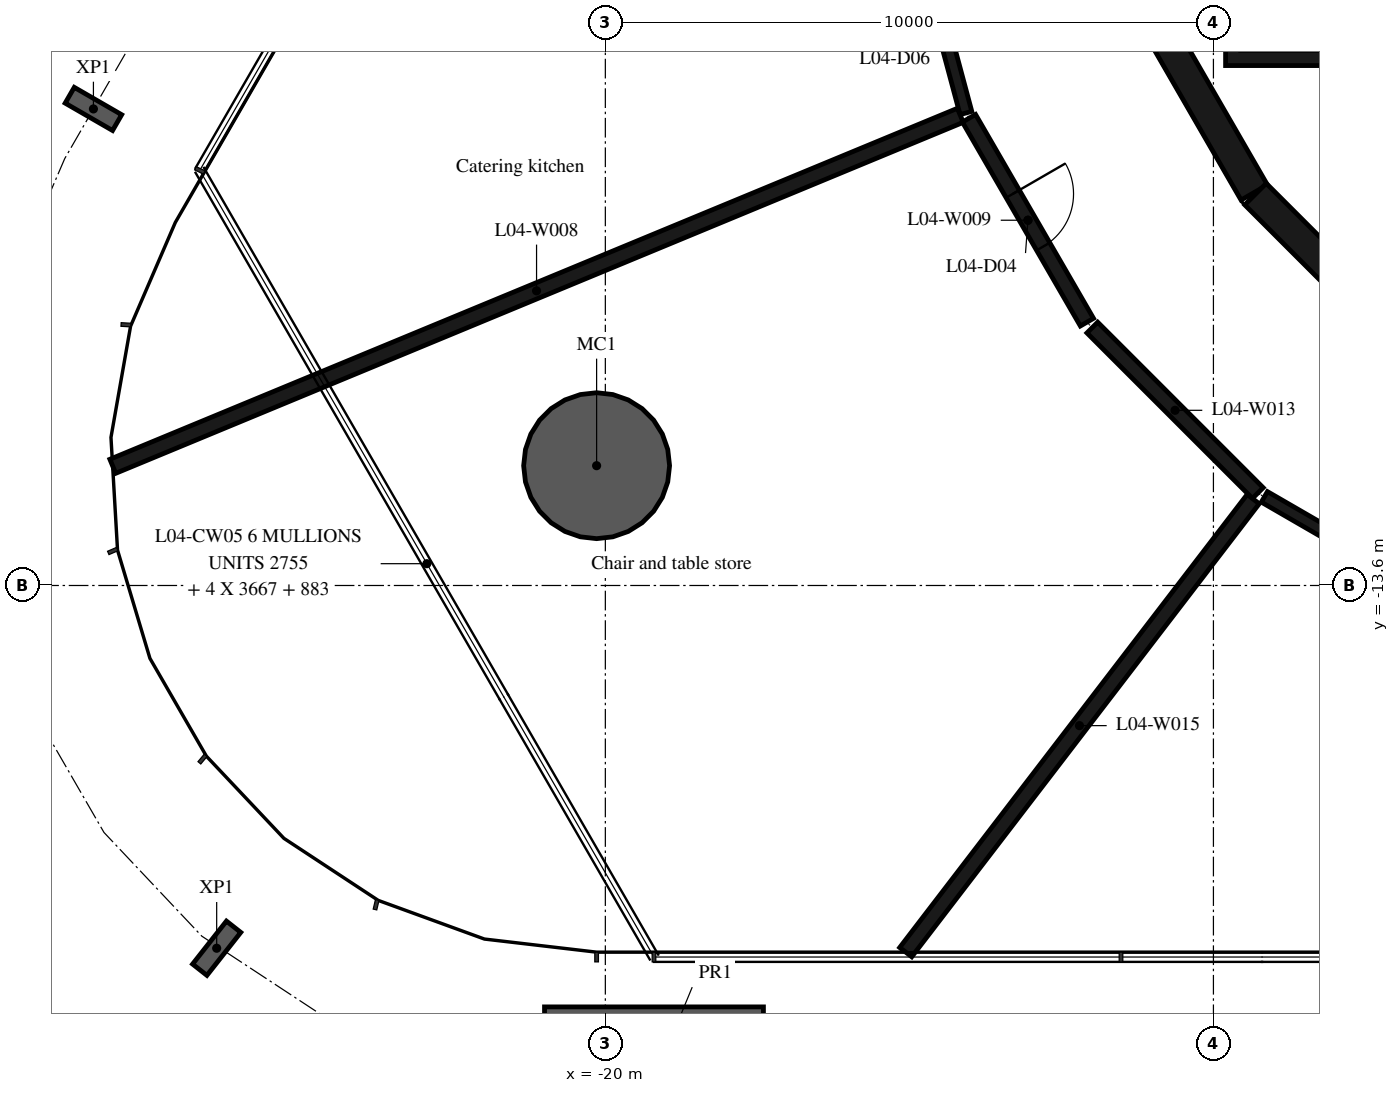
"""IFC4 building model, lengths in metres.
Left out: names, types, materials, properties, quantities, classifications, styles, units other than length and angle.
Written with IfcOpenShell. Run it as: python <this file> out.ifc"""

import sys

from ifc_helpers import new_model, si_unit, direction, frame, frame_2d, origin, origin_2d, place, context, subcontext, project, spatial, polyline, rectangle, hollow_circle, i_section, outline, extrude, element, fill, save


model = new_model("IFC4")
c1 = context("Model", 3, precision=1e-05, world=origin(), true_north=direction((0.0, 1.0)))
c2 = subcontext(c1, "Body", "Model", "MODEL_VIEW")
j1 = project(units=[si_unit("LENGTHUNIT", "METRE"), si_unit("PLANEANGLEUNIT", "RADIAN")], contexts=[c1])
p1 = place(None, origin())
s1 = spatial("IfcSite", under=j1, at=p1, CompositionType="ELEMENT")
p2 = place(p1, origin())
s2 = spatial("IfcBuilding", under=s1, at=p2, CompositionType="ELEMENT")
p3 = place(p2, frame((0.0, 0.0, 23.4)))
s3 = spatial("IfcBuildingStorey", under=s2, at=p3, CompositionType="ELEMENT", Elevation=23.4)
p4 = place(p3, frame((-20.144, -11.63, -0.38), z_axis=(0.0, 0.0, 1.0), x_axis=(1.0, 0.0, 0.0)))
e1 = element("IfcColumn", 1, at=p4, inside=s3, PredefinedType="COLUMN", context=c2, shape_type="SweptSolid", body=[
    extrude(hollow_circle(Radius=1.2, WallThickness=0.06, at=origin_2d()), origin(), (0.0, 0.0, 1.0), 4.8),
])
for number, where, z_axis, x_axis in (
    (2, (-28.419, -5.763, -0.38), (0.0, 0.0, 1.0), (0.5, 0.866, 0.0)),
    (3, (-26.392, -19.565, -0.38), (0.0, 0.0, 1.0), (-0.786, 0.619, 0.0)),
):
    element("IfcColumn", number, at=place(p3, frame(where, z_axis=z_axis, x_axis=x_axis)), inside=s3, PredefinedType="COLUMN", context=c2, shape_type="SweptSolid", body=[
        extrude(i_section(OverallWidth=0.3, OverallDepth=0.9, WebThickness=0.019, FlangeThickness=0.035, FilletRadius=0.03, at=origin_2d()), origin(), (0.0, 0.0, 1.0), 4.8),
    ])
p5 = place(p3, frame((-19.2, -21.73, -0.38), z_axis=(0.0, 0.0, 1.0), x_axis=(1.0, 0.0, 0.0)))
e4 = element("IfcColumn", 4, at=p5, inside=s3, PredefinedType="COLUMN", context=c2, shape_type="SweptSolid", body=[
    extrude(rectangle(XDim=3.6, YDim=2.4, at=origin_2d()), origin(), (0.0, 0.0, 1.0), 4.8),
])
p6 = place(p3, frame((-10.845, -4.51, 0.0), z_axis=(0.0, 0.0, 1.0), x_axis=(0.500087131594, -0.865975092491, 0.0)))
e5 = element("IfcWall", 5, at=p6, inside=s3, PredefinedType="SHEAR", context=c2, shape_type="SweptSolid", body=[
    extrude(rectangle(XDim=3.033, YDim=0.5, at=frame_2d((1.516, 0.0))), origin(), (0.0, 0.0, 1.0), 4.42),
])
p7 = place(p3, frame((-9.308, -7.164, 0.0), z_axis=(0.0, 0.0, 1.0), x_axis=(0.707106781187, -0.707106781187, 0.0)))
e6 = element("IfcWall", 6, at=p7, inside=s3, PredefinedType="SHEAR", context=c2, shape_type="SweptSolid", body=[
    extrude(rectangle(XDim=3.032, YDim=0.5, at=frame_2d((1.516, 0.0))), origin(), (0.0, 0.0, 1.0), 4.42),
])
p8 = place(p3, origin())
e7 = element("IfcWall", 7, at=p8, inside=s3, PredefinedType="SHEAR", context=c2, shape_type="SweptSolid", body=[
    extrude(outline(polyline([(9.8, -5.05), (9.8, -4.8), (9.8, -1.9), (9.55, -1.9), (9.55, -4.8), (7.65, -4.8), (7.65, -1.9), (7.4, -1.9), (7.4, -4.8), (5.5, -4.8), (5.5, -1.9), (5.25, -1.9), (5.25, -4.8), (3.35, -4.8), (3.35, -1.9), (3.1, -1.9), (3.1, -4.8), (-5.25, -4.8), (-5.25, -1.9), (-5.5, -1.9), (-5.5, -4.8), (-7.4, -4.8), (-7.4, -1.9), (-7.65, -1.9), (-7.65, -4.8), (-9.55, -4.8), (-9.55, -1.9), (-9.8, -1.9), (-9.8, -4.8), (-9.8, -5.05), (9.8, -5.05)])), origin(), (0.0, 0.0, 1.0), 4.42),
])
p9 = place(p3, frame((-15.074, -2.087, 0.0), z_axis=(0.0, 0.0, 1.0), x_axis=(0.259026804199, -0.965870133458, 0.0)))
e8 = element("IfcWall", 8, at=p9, inside=s3, PredefinedType="PARTITIONING", context=c2, shape_type="SweptSolid", body=[
    extrude(rectangle(XDim=3.876, YDim=0.2, at=frame_2d((1.938, 0.0))), origin(), (0.0, 0.0, 1.0), 4.42),
])
p10 = place(p9, frame((1.438, 0.0, 0.0)))
e9 = element("IfcOpeningElement", 9, at=p10, cuts=e8, PredefinedType="OPENING", context=c2, shape_type="SweptSolid", body=[
    extrude(rectangle(XDim=1.0, YDim=2.1, at=frame_2d((0.5, 1.05))), frame((0.0, 0.11, 0.0), z_axis=(0.0, -1.0, 0.0), x_axis=(1.0, 0.0, 0.0)), (0.0, 0.0, 1.0), 0.22),
])
p11 = place(p3, frame((-14.162, -5.868, 0.0), z_axis=(0.0, 0.0, 1.0), x_axis=(-0.923914077449, -0.382600022859, 0.0)))
e10 = element("IfcWall", 10, at=p11, inside=s3, PredefinedType="PARTITIONING", context=c2, shape_type="SweptSolid", body=[
    extrude(rectangle(XDim=15.085, YDim=0.25, at=frame_2d((7.543, 0.0))), origin(), (0.0, 0.0, 1.0), 4.42),
])
p12 = place(p3, frame((-14.02, -5.917, 0.0), z_axis=(0.0, 0.0, 1.0), x_axis=(0.500733182901, -0.865601686425, 0.0)))
e11 = element("IfcWall", 11, at=p12, inside=s3, PredefinedType="PARTITIONING", context=c2, shape_type="SweptSolid", body=[
    extrude(rectangle(XDim=3.874, YDim=0.25, at=frame_2d((1.937, 0.0))), origin(), (0.0, 0.0, 1.0), 4.42),
])
p13 = place(p12, frame((1.437, 0.0, 0.0)))
e12 = element("IfcOpeningElement", 12, at=p13, cuts=e11, PredefinedType="OPENING", context=c2, shape_type="SweptSolid", body=[
    extrude(rectangle(XDim=1.0, YDim=2.1, at=frame_2d((0.5, 1.05))), frame((0.0, 0.135, 0.0), z_axis=(0.0, -1.0, 0.0), x_axis=(1.0, 0.0, 0.0)), (0.0, 0.0, 1.0), 0.27),
])
p14 = place(p3, frame((-11.992, -9.358, 0.0), z_axis=(0.0, 0.0, 1.0), x_axis=(0.707106781187, -0.707106781187, 0.0)))
e13 = element("IfcWall", 13, at=p14, inside=s3, PredefinedType="PARTITIONING", context=c2, shape_type="SweptSolid", body=[
    extrude(rectangle(XDim=3.849, YDim=0.25, at=frame_2d((1.925, 0.0))), origin(), (0.0, 0.0, 1.0), 4.42),
])
p15 = place(p3, frame((-9.346, -12.179, 0.0), z_axis=(0.0, 0.0, 1.0), x_axis=(-0.608560359422, -0.793507585937, 0.0)))
e14 = element("IfcWall", 14, at=p15, inside=s3, PredefinedType="PARTITIONING", context=c2, shape_type="SweptSolid", body=[
    extrude(rectangle(XDim=9.39, YDim=0.25, at=frame_2d((4.695, 0.0))), origin(), (0.0, 0.0, 1.0), 4.42),
])
p16 = place(p3, frame((-9.162, -12.143, 0.0), z_axis=(0.0, 0.0, 1.0), x_axis=(0.865588360659, -0.500756218026, 0.0)))
e15 = element("IfcWall", 15, at=p16, inside=s3, PredefinedType="PARTITIONING", context=c2, shape_type="SweptSolid", body=[
    extrude(rectangle(XDim=3.849, YDim=0.2, at=frame_2d((1.925, 0.0))), origin(), (0.0, 0.0, 1.0), 4.42),
])
p17 = place(p13, origin())
e16 = element("IfcDoor", 16, at=p17, inside=s3, OperationType="SINGLE_SWING_LEFT", PredefinedType="DOOR", context=c2, shape_type="SweptSolid", body=[
    extrude(rectangle(XDim=1.0, YDim=2.1, at=frame_2d((0.5, 1.05))), frame((0.0, 0.025, 0.0), z_axis=(0.0, -1.0, 0.0), x_axis=(1.0, 0.0, 0.0)), (0.0, 0.0, 1.0), 0.05),
])
fill(e12, e16)
save(model, sys.argv[1])
